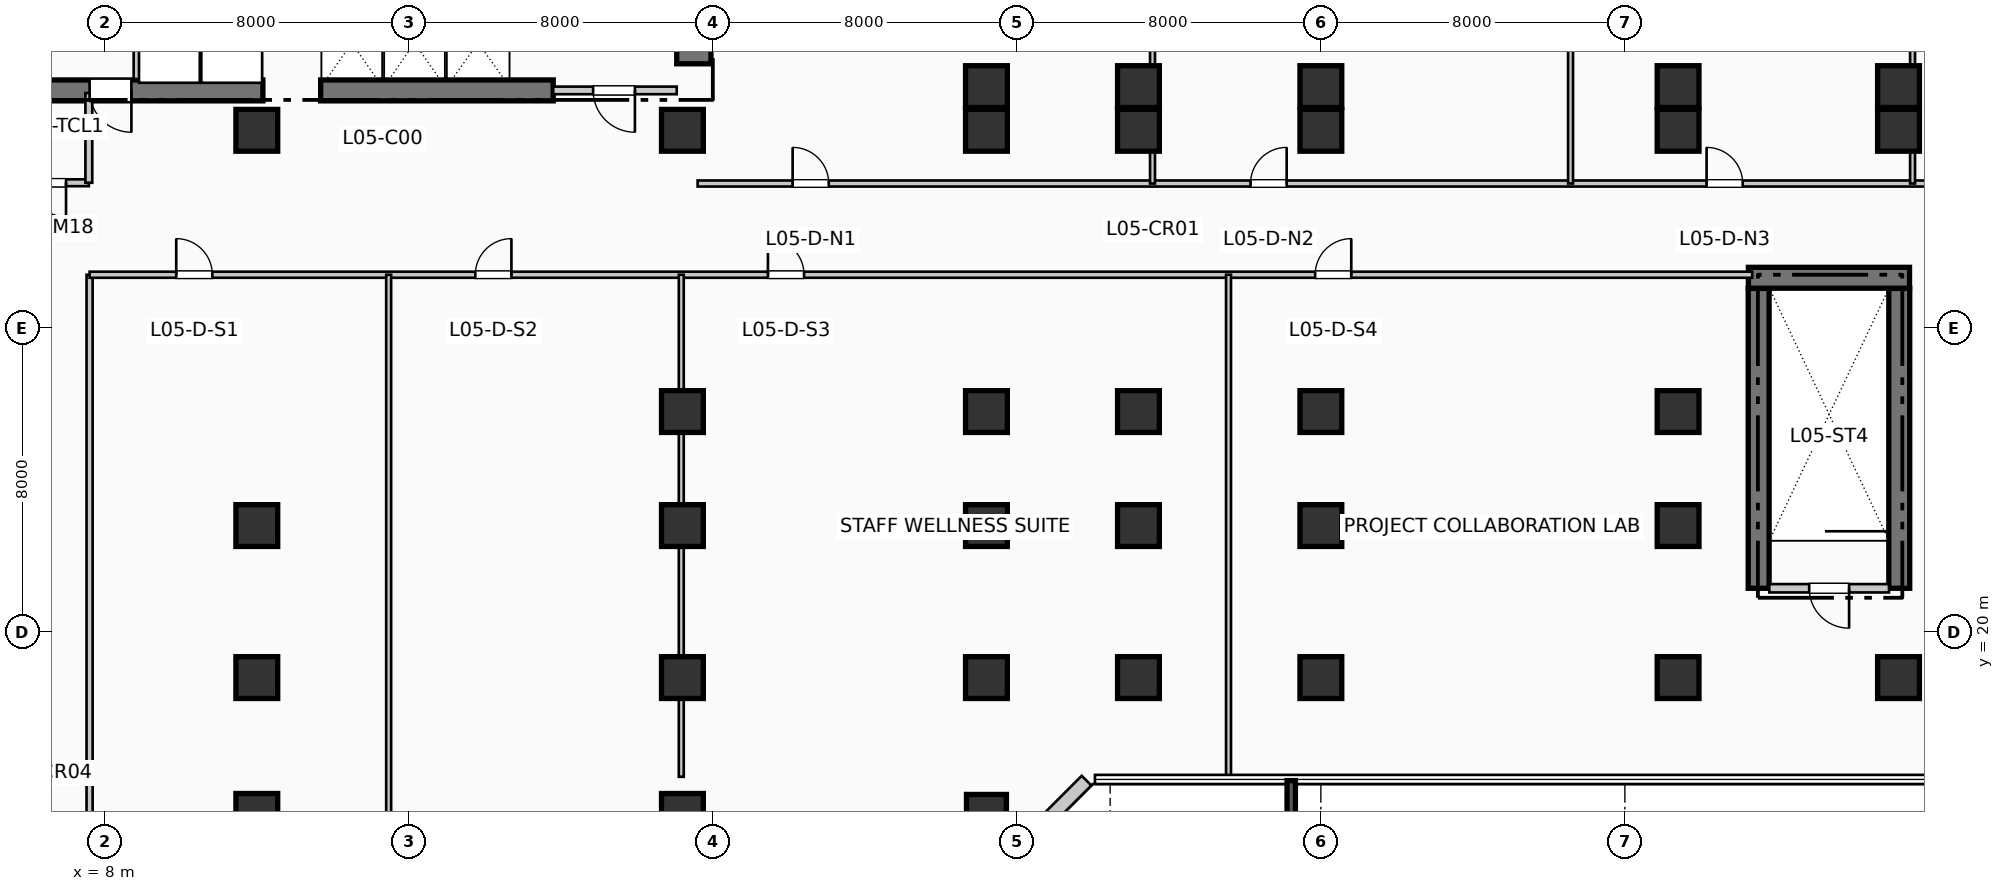
"""IFC4 building model, lengths in metres.
Left out: names, types, materials, properties, quantities, classifications, styles, units other than length and angle.
Written with IfcOpenShell. Run it as: python <this file> out.ifc"""

import sys

from ifc_helpers import new_model, si_unit, direction, frame, frame_2d, origin, origin_2d, place, context, subcontext, project, spatial, rectangle, extrude, element, fill, save


model = new_model("IFC4")
c1 = context("Model", 3, precision=1e-05, world=origin(), true_north=direction((0.0, 1.0)))
c2 = subcontext(c1, "Body", "Model", "MODEL_VIEW")
j1 = project(units=[si_unit("LENGTHUNIT", "METRE"), si_unit("PLANEANGLEUNIT", "RADIAN")], contexts=[c1])
p1 = place(None, origin())
s1 = spatial("IfcSite", under=j1, at=p1, CompositionType="ELEMENT")
p2 = place(p1, origin())
s2 = spatial("IfcBuilding", under=s1, at=p2, CompositionType="ELEMENT")
p3 = place(p2, frame((0.0, 0.0, 25.74)))
s3 = spatial("IfcBuildingStorey", under=s2, at=p3, CompositionType="ELEMENT", Elevation=25.74)
p4 = place(p3, frame((23.5, 34.95, 0.0), z_axis=(0.0, 0.0, 1.0), x_axis=(0.0, 1.0, 0.0)))
e1 = element("IfcWall", 1, at=p4, inside=s3, PredefinedType="SHEAR", context=c2, shape_type="SweptSolid", body=[
    extrude(rectangle(XDim=10.64, YDim=0.9, at=frame_2d((5.32, 0.0))), origin(), (0.0, 0.0, 1.0), 4.62),
])
p5 = place(p3, frame((1.45, 34.25, 0.0), z_axis=(0.0, 0.0, 1.0), x_axis=(1.0, 0.0, 0.0)))
e2 = element("IfcWall", 2, at=p5, inside=s3, PredefinedType="SHEAR", context=c2, shape_type="SweptSolid", body=[
    extrude(rectangle(XDim=10.71, YDim=0.55, at=frame_2d((5.355, 0.0))), origin(), (0.0, 0.0, 1.0), 4.62),
])
p6 = place(p5, frame((7.25, 0.0, 0.0), z_axis=(0.0, 0.0, 1.0), x_axis=(-1.0, 0.0, 0.0)))
e3 = element("IfcOpeningElement", 3, at=p6, cuts=e2, PredefinedType="OPENING", context=c2, shape_type="SweptSolid", body=[
    extrude(rectangle(XDim=1.1, YDim=2.15, at=frame_2d((0.55, 1.075))), frame((0.0, 0.285, 0.0), z_axis=(0.0, -1.0, 0.0), x_axis=(1.0, 0.0, 0.0)), (0.0, 0.0, 1.0), 0.57),
])
p7 = place(p3, frame((13.68, 34.25, 0.0), z_axis=(0.0, 0.0, 1.0), x_axis=(1.0, 0.0, 0.0)))
e4 = element("IfcWall", 4, at=p7, inside=s3, PredefinedType="SHEAR", context=c2, shape_type="SweptSolid", body=[
    extrude(rectangle(XDim=6.12, YDim=0.55, at=frame_2d((3.06, 0.0))), origin(), (0.0, 0.0, 1.0), 4.62),
])
for number, where, z_axis, x_axis in (
    (5, (51.52, 21.15, 0.0), (0.0, 0.0, 1.0), (0.0, 1.0, 0.0)),
    (6, (55.22, 21.15, 0.0), (0.0, 0.0, 1.0), (0.0, 1.0, 0.0)),
):
    element("IfcWall", number, at=place(p3, frame(where, z_axis=z_axis, x_axis=x_axis)), inside=s3, PredefinedType="SHEAR", context=c2, shape_type="SweptSolid", body=[
        extrude(rectangle(XDim=7.89, YDim=0.55, at=frame_2d((3.945, 0.0))), origin(), (0.0, 0.0, 1.0), 4.62),
    ])
p8 = place(p3, frame((51.25, 29.32, 0.0), z_axis=(0.0, 0.0, 1.0), x_axis=(1.0, 0.0, 0.0)))
e7 = element("IfcWall", 7, at=p8, inside=s3, PredefinedType="SHEAR", context=c2, shape_type="SweptSolid", body=[
    extrude(rectangle(XDim=4.24, YDim=0.55, at=frame_2d((2.12, 0.0))), origin(), (0.0, 0.0, 1.0), 4.62),
])
for number, where, z_axis, x_axis in (
    (8, (12.0, 15.2, 0.0), (0.0, 0.0, 1.0), (1.0, 0.0, 0.0)),
    (9, (12.0, 18.8, 0.0), (0.0, 0.0, 1.0), (1.0, 0.0, 0.0)),
    (10, (12.0, 22.8, 0.0), (0.0, 0.0, 1.0), (1.0, 0.0, 0.0)),
    (11, (12.0, 33.2, 0.0), (0.0, 0.0, 1.0), (1.0, 0.0, 0.0)),
    (12, (23.2, 15.2, 0.0), (0.0, 0.0, 1.0), (1.0, 0.0, 0.0)),
    (13, (23.2, 18.8, 0.0), (0.0, 0.0, 1.0), (1.0, 0.0, 0.0)),
    (14, (23.2, 22.8, 0.0), (0.0, 0.0, 1.0), (1.0, 0.0, 0.0)),
    (15, (23.2, 25.8, 0.0), (0.0, 0.0, 1.0), (1.0, 0.0, 0.0)),
    (16, (23.2, 33.2, 0.0), (0.0, 0.0, 1.0), (1.0, 0.0, 0.0)),
):
    element("IfcColumn", number, at=place(p3, frame(where, z_axis=z_axis, x_axis=x_axis)), inside=s3, PredefinedType="COLUMN", context=c2, shape_type="SweptSolid", body=[
        extrude(rectangle(XDim=1.1, YDim=1.1, at=origin_2d()), origin(), (0.0, 0.0, 1.0), 4.62),
    ])
p9 = place(p3, frame((31.2, 15.2, 0.0), z_axis=(0.0, 0.0, 1.0), x_axis=(1.0, 0.0, 0.0)))
e17 = element("IfcColumn", 17, at=p9, inside=s3, PredefinedType="COLUMN", context=c2, shape_type="SweptSolid", body=[
    extrude(rectangle(XDim=1.05, YDim=1.05, at=origin_2d()), origin(), (0.0, 0.0, 1.0), 4.62),
])
for number, where, z_axis, x_axis in (
    (18, (31.2, 18.8, 0.0), (0.0, 0.0, 1.0), (1.0, 0.0, 0.0)),
    (19, (31.2, 22.8, 0.0), (0.0, 0.0, 1.0), (1.0, 0.0, 0.0)),
    (20, (31.2, 25.8, 0.0), (0.0, 0.0, 1.0), (1.0, 0.0, 0.0)),
    (21, (31.2, 33.2, 0.0), (0.0, 0.0, 1.0), (1.0, 0.0, 0.0)),
    (22, (31.2, 34.35, 0.0), (0.0, 0.0, 1.0), (1.0, 0.0, 0.0)),
    (23, (35.2, 18.8, 0.0), (0.0, 0.0, 1.0), (1.0, 0.0, 0.0)),
    (24, (35.2, 22.8, 0.0), (0.0, 0.0, 1.0), (1.0, 0.0, 0.0)),
    (25, (35.2, 25.8, 0.0), (0.0, 0.0, 1.0), (1.0, 0.0, 0.0)),
    (26, (35.2, 33.2, 0.0), (0.0, 0.0, 1.0), (1.0, 0.0, 0.0)),
    (27, (35.2, 34.35, 0.0), (0.0, 0.0, 1.0), (1.0, 0.0, 0.0)),
    (28, (40.0, 18.8, 0.0), (0.0, 0.0, 1.0), (1.0, 0.0, 0.0)),
    (29, (40.0, 22.8, 0.0), (0.0, 0.0, 1.0), (1.0, 0.0, 0.0)),
    (30, (40.0, 25.8, 0.0), (0.0, 0.0, 1.0), (1.0, 0.0, 0.0)),
    (31, (40.0, 33.2, 0.0), (0.0, 0.0, 1.0), (1.0, 0.0, 0.0)),
    (32, (40.0, 34.35, 0.0), (0.0, 0.0, 1.0), (1.0, 0.0, 0.0)),
    (33, (49.4, 18.8, 0.0), (0.0, 0.0, 1.0), (1.0, 0.0, 0.0)),
    (34, (49.4, 22.8, 0.0), (0.0, 0.0, 1.0), (1.0, 0.0, 0.0)),
    (35, (49.4, 25.8, 0.0), (0.0, 0.0, 1.0), (1.0, 0.0, 0.0)),
    (36, (49.4, 33.2, 0.0), (0.0, 0.0, 1.0), (1.0, 0.0, 0.0)),
    (37, (49.4, 34.35, 0.0), (0.0, 0.0, 1.0), (1.0, 0.0, 0.0)),
    (38, (55.2, 18.8, 0.0), (0.0, 0.0, 1.0), (1.0, 0.0, 0.0)),
    (39, (55.2, 33.2, 0.0), (0.0, 0.0, 1.0), (1.0, 0.0, 0.0)),
    (40, (55.2, 34.35, 0.0), (0.0, 0.0, 1.0), (1.0, 0.0, 0.0)),
):
    element("IfcColumn", number, at=place(p3, frame(where, z_axis=z_axis, x_axis=x_axis)), inside=s3, PredefinedType="COLUMN", context=c2, shape_type="SweptSolid", body=[
        extrude(rectangle(XDim=1.1, YDim=1.1, at=origin_2d()), origin(), (0.0, 0.0, 1.0), 4.62),
    ])
p10 = place(p3, frame((31.912, 14.166, 0.0), z_axis=(0.0, 0.0, 1.0), x_axis=(0.707106781187, 0.707106781187, 0.0)))
e41 = element("IfcWall", 41, at=p10, inside=s3, PredefinedType="SOLIDWALL", context=c2, shape_type="SweptSolid", body=[
    extrude(rectangle(XDim=2.718, YDim=0.36, at=frame_2d((1.359, 0.0))), origin(), (0.0, 0.0, 1.0), 4.37),
])
p11 = place(p3, frame((8.86, 34.55, 0.0), z_axis=(0.0, 0.0, 1.0), x_axis=(0.0, 1.0, 0.0)))
e42 = element("IfcWall", 42, at=p11, inside=s3, PredefinedType="PARTITIONING", context=c2, shape_type="SweptSolid", body=[
    extrude(rectangle(XDim=2.5, YDim=0.2, at=frame_2d((1.25, 0.0))), origin(), (0.0, 0.0, 1.0), 4.37),
])
p12 = place(p3, frame((19.8, 34.25, 0.0), z_axis=(0.0, 0.0, 1.0), x_axis=(1.0, 0.0, 0.0)))
e43 = element("IfcWall", 43, at=p12, inside=s3, PredefinedType="PARTITIONING", context=c2, shape_type="SweptSolid", body=[
    extrude(rectangle(XDim=3.25, YDim=0.2, at=frame_2d((1.625, 0.0))), origin(), (0.0, 0.0, 1.0), 4.37),
])
p13 = place(p12, frame((2.15, 0.0, 0.0), z_axis=(0.0, 0.0, 1.0), x_axis=(-1.0, 0.0, 0.0)))
e44 = element("IfcOpeningElement", 44, at=p13, cuts=e43, PredefinedType="OPENING", context=c2, shape_type="SweptSolid", body=[
    extrude(rectangle(XDim=1.1, YDim=2.15, at=frame_2d((0.55, 1.075))), frame((0.0, 0.11, 0.0), z_axis=(0.0, -1.0, 0.0), x_axis=(1.0, 0.0, 0.0)), (0.0, 0.0, 1.0), 0.22),
])
p14 = place(p3, frame((5.5, 31.82, 0.0), z_axis=(0.0, 0.0, 1.0), x_axis=(1.0, 0.0, 0.0)))
e45 = element("IfcWall", 45, at=p14, inside=s3, PredefinedType="PLUMBINGWALL", context=c2, shape_type="SweptSolid", body=[
    extrude(rectangle(XDim=2.08, YDim=0.18, at=frame_2d((1.04, 0.0))), origin(), (0.0, 0.0, 1.0), 4.37),
])
p15 = place(p14, frame((1.48, 0.0, 0.0), z_axis=(0.0, 0.0, 1.0), x_axis=(-1.0, 0.0, 0.0)))
e46 = element("IfcOpeningElement", 46, at=p15, cuts=e45, PredefinedType="OPENING", context=c2, shape_type="SweptSolid", body=[
    extrude(rectangle(XDim=0.9, YDim=2.1, at=frame_2d((0.45, 1.05))), frame((0.0, 0.1, 0.0), z_axis=(0.0, -1.0, 0.0), x_axis=(1.0, 0.0, 0.0)), (0.0, 0.0, 1.0), 0.2),
])
p16 = place(p3, frame((7.58, 31.82, 0.0), z_axis=(0.0, 0.0, 1.0), x_axis=(0.0, 1.0, 0.0)))
e47 = element("IfcWall", 47, at=p16, inside=s3, PredefinedType="PLUMBINGWALL", context=c2, shape_type="SweptSolid", body=[
    extrude(rectangle(XDim=2.36, YDim=0.18, at=frame_2d((1.18, 0.0))), origin(), (0.0, 0.0, 1.0), 4.37),
])
p17 = place(p3, frame((51.8, 21.15, 0.0), z_axis=(0.0, 0.0, 1.0), x_axis=(1.0, 0.0, 0.0)))
e48 = element("IfcWall", 48, at=p17, inside=s3, PredefinedType="PARTITIONING", context=c2, shape_type="SweptSolid", body=[
    extrude(rectangle(XDim=3.15, YDim=0.22, at=frame_2d((1.575, 0.0))), origin(), (0.0, 0.0, 1.0), 4.37),
])
p18 = place(p17, frame((2.1, 0.0, 0.0), z_axis=(0.0, 0.0, 1.0), x_axis=(-1.0, 0.0, 0.0)))
e49 = element("IfcOpeningElement", 49, at=p18, cuts=e48, PredefinedType="OPENING", context=c2, shape_type="SweptSolid", body=[
    extrude(rectangle(XDim=1.05, YDim=2.15, at=frame_2d((0.525, 1.075))), frame((0.0, 0.12, 0.0), z_axis=(0.0, -1.0, 0.0), x_axis=(1.0, 0.0, 0.0)), (0.0, 0.0, 1.0), 0.24),
])
p19 = place(p3, frame((7.6, -1.81, 0.0), z_axis=(0.0, 0.0, 1.0), x_axis=(0.0, 1.0, 0.0)))
e50 = element("IfcWall", 50, at=p19, inside=s3, PredefinedType="PARTITIONING", context=c2, shape_type="SweptSolid", body=[
    extrude(rectangle(XDim=31.21, YDim=0.16, at=frame_2d((15.605, 0.0))), origin(), (0.0, 0.0, 1.0), 4.37),
])
p20 = place(p3, frame((7.6, 29.4, 0.0), z_axis=(0.0, 0.0, 1.0), x_axis=(1.0, 0.0, 0.0)))
e51 = element("IfcWall", 51, at=p20, inside=s3, PredefinedType="PARTITIONING", context=c2, shape_type="SweptSolid", body=[
    extrude(rectangle(XDim=43.75, YDim=0.16, at=frame_2d((21.875, 0.0))), origin(), (0.0, 0.0, 1.0), 4.025),
])
p21 = place(p20, frame((2.28, 0.0, 0.0)))
e52 = element("IfcOpeningElement", 52, at=p21, cuts=e51, PredefinedType="OPENING", context=c2, shape_type="SweptSolid", body=[
    extrude(rectangle(XDim=0.95, YDim=2.15, at=frame_2d((0.475, 1.075))), frame((0.0, 0.09, 0.0), z_axis=(0.0, -1.0, 0.0), x_axis=(1.0, 0.0, 0.0)), (0.0, 0.0, 1.0), 0.18),
])
p22 = place(p20, frame((10.15, 0.0, 0.0)))
e53 = element("IfcOpeningElement", 53, at=p22, cuts=e51, PredefinedType="OPENING", context=c2, shape_type="SweptSolid", body=[
    extrude(rectangle(XDim=0.95, YDim=2.15, at=frame_2d((0.475, 1.075))), frame((0.0, 0.09, 0.0), z_axis=(0.0, -1.0, 0.0), x_axis=(1.0, 0.0, 0.0)), (0.0, 0.0, 1.0), 0.18),
])
p23 = place(p20, frame((17.85, 0.0, 0.0)))
e54 = element("IfcOpeningElement", 54, at=p23, cuts=e51, PredefinedType="OPENING", context=c2, shape_type="SweptSolid", body=[
    extrude(rectangle(XDim=0.95, YDim=2.15, at=frame_2d((0.475, 1.075))), frame((0.0, 0.09, 0.0), z_axis=(0.0, -1.0, 0.0), x_axis=(1.0, 0.0, 0.0)), (0.0, 0.0, 1.0), 0.18),
])
p24 = place(p20, frame((32.25, 0.0, 0.0)))
e55 = element("IfcOpeningElement", 55, at=p24, cuts=e51, PredefinedType="OPENING", context=c2, shape_type="SweptSolid", body=[
    extrude(rectangle(XDim=0.95, YDim=2.15, at=frame_2d((0.475, 1.075))), frame((0.0, 0.09, 0.0), z_axis=(0.0, -1.0, 0.0), x_axis=(1.0, 0.0, 0.0)), (0.0, 0.0, 1.0), 0.18),
])
p25 = place(p3, frame((15.47, -1.81, 0.0), z_axis=(0.0, 0.0, 1.0), x_axis=(0.0, 1.0, 0.0)))
e56 = element("IfcWall", 56, at=p25, inside=s3, PredefinedType="PARTITIONING", context=c2, shape_type="SweptSolid", body=[
    extrude(rectangle(XDim=31.21, YDim=0.13, at=frame_2d((15.605, 0.0))), origin(), (0.0, 0.0, 1.0), 4.37),
])
p26 = place(p3, frame((23.17, 16.19, 0.0), z_axis=(0.0, 0.0, 1.0), x_axis=(0.0, 1.0, 0.0)))
e57 = element("IfcWall", 57, at=p26, inside=s3, PredefinedType="PARTITIONING", context=c2, shape_type="SweptSolid", body=[
    extrude(rectangle(XDim=13.21, YDim=0.13, at=frame_2d((6.605, 0.0))), origin(), (0.0, 0.0, 1.0), 3.555),
])
p27 = place(p3, frame((37.57, 16.19, 0.0), z_axis=(0.0, 0.0, 1.0), x_axis=(0.0, 1.0, 0.0)))
e58 = element("IfcWall", 58, at=p27, inside=s3, PredefinedType="PARTITIONING", context=c2, shape_type="SweptSolid", body=[
    extrude(rectangle(XDim=13.21, YDim=0.13, at=frame_2d((6.605, 0.0))), origin(), (0.0, 0.0, 1.0), 4.37),
])
p28 = place(p3, frame((23.6, 31.8, 0.0), z_axis=(0.0, 0.0, 1.0), x_axis=(1.0, 0.0, 0.0)))
e59 = element("IfcWall", 59, at=p28, inside=s3, PredefinedType="PARTITIONING", context=c2, shape_type="SweptSolid", body=[
    extrude(rectangle(XDim=42.21, YDim=0.16, at=frame_2d((21.105, 0.0))), origin(), (0.0, 0.0, 1.0), 4.37),
])
p29 = place(p28, frame((2.5, 0.0, 0.0)))
e60 = element("IfcOpeningElement", 60, at=p29, cuts=e59, PredefinedType="OPENING", context=c2, shape_type="SweptSolid", body=[
    extrude(rectangle(XDim=0.95, YDim=2.15, at=frame_2d((0.475, 1.075))), frame((0.0, 0.09, 0.0), z_axis=(0.0, -1.0, 0.0), x_axis=(1.0, 0.0, 0.0)), (0.0, 0.0, 1.0), 0.18),
])
p30 = place(p28, frame((14.55, 0.0, 0.0)))
e61 = element("IfcOpeningElement", 61, at=p30, cuts=e59, PredefinedType="OPENING", context=c2, shape_type="SweptSolid", body=[
    extrude(rectangle(XDim=0.95, YDim=2.15, at=frame_2d((0.475, 1.075))), frame((0.0, 0.09, 0.0), z_axis=(0.0, -1.0, 0.0), x_axis=(1.0, 0.0, 0.0)), (0.0, 0.0, 1.0), 0.18),
])
p31 = place(p28, frame((26.55, 0.0, 0.0)))
e62 = element("IfcOpeningElement", 62, at=p31, cuts=e59, PredefinedType="OPENING", context=c2, shape_type="SweptSolid", body=[
    extrude(rectangle(XDim=0.95, YDim=2.15, at=frame_2d((0.475, 1.075))), frame((0.0, 0.09, 0.0), z_axis=(0.0, -1.0, 0.0), x_axis=(1.0, 0.0, 0.0)), (0.0, 0.0, 1.0), 0.18),
])
p32 = place(p28, frame((34.55, 0.0, 0.0)))
e63 = element("IfcOpeningElement", 63, at=p32, cuts=e59, PredefinedType="OPENING", context=c2, shape_type="SweptSolid", body=[
    extrude(rectangle(XDim=0.95, YDim=2.15, at=frame_2d((0.475, 1.075))), frame((0.0, 0.09, 0.0), z_axis=(0.0, -1.0, 0.0), x_axis=(1.0, 0.0, 0.0)), (0.0, 0.0, 1.0), 0.18),
])
p33 = place(p3, frame((35.57, 31.8, 0.0), z_axis=(0.0, 0.0, 1.0), x_axis=(0.0, 1.0, 0.0)))
e64 = element("IfcWall", 64, at=p33, inside=s3, PredefinedType="PARTITIONING", context=c2, shape_type="SweptSolid", body=[
    extrude(rectangle(XDim=16.01, YDim=0.13, at=frame_2d((8.005, 0.0))), origin(), (0.0, 0.0, 1.0), 3.555),
])
p34 = place(p3, frame((46.57, 31.8, 0.0), z_axis=(0.0, 0.0, 1.0), x_axis=(0.0, 1.0, 0.0)))
e65 = element("IfcWall", 65, at=p34, inside=s3, PredefinedType="PARTITIONING", context=c2, shape_type="SweptSolid", body=[
    extrude(rectangle(XDim=16.01, YDim=0.13, at=frame_2d((8.005, 0.0))), origin(), (0.0, 0.0, 1.0), 4.37),
])
p35 = place(p3, frame((55.57, 31.8, 0.0), z_axis=(0.0, 0.0, 1.0), x_axis=(0.0, 1.0, 0.0)))
e66 = element("IfcWall", 66, at=p35, inside=s3, PredefinedType="PARTITIONING", context=c2, shape_type="SweptSolid", body=[
    extrude(rectangle(XDim=16.01, YDim=0.13, at=frame_2d((8.005, 0.0))), origin(), (0.0, 0.0, 1.0), 3.555),
])
p36 = place(p6, origin())
e67 = element("IfcDoor", 67, at=p36, inside=s3, OperationType="SINGLE_SWING_RIGHT", PredefinedType="DOOR", context=c2, shape_type="SweptSolid", body=[
    extrude(rectangle(XDim=1.1, YDim=2.15, at=frame_2d((0.55, 1.075))), frame((0.0, 0.025, 0.0), z_axis=(0.0, -1.0, 0.0), x_axis=(1.0, 0.0, 0.0)), (0.0, 0.0, 1.0), 0.05),
])
fill(e3, e67)
p37 = place(p13, origin())
e68 = element("IfcDoor", 68, at=p37, inside=s3, OperationType="SINGLE_SWING_RIGHT", PredefinedType="DOOR", context=c2, shape_type="SweptSolid", body=[
    extrude(rectangle(XDim=1.1, YDim=2.15, at=frame_2d((0.55, 1.075))), frame((0.0, 0.025, 0.0), z_axis=(0.0, -1.0, 0.0), x_axis=(1.0, 0.0, 0.0)), (0.0, 0.0, 1.0), 0.05),
])
fill(e44, e68)
p38 = place(p15, origin())
e69 = element("IfcDoor", 69, at=p38, inside=s3, OperationType="SINGLE_SWING_RIGHT", PredefinedType="DOOR", context=c2, shape_type="SweptSolid", body=[
    extrude(rectangle(XDim=0.9, YDim=2.1, at=frame_2d((0.45, 1.05))), frame((0.0, 0.025, 0.0), z_axis=(0.0, -1.0, 0.0), x_axis=(1.0, 0.0, 0.0)), (0.0, 0.0, 1.0), 0.05),
])
fill(e46, e69)
p39 = place(p18, origin())
e70 = element("IfcDoor", 70, at=p39, inside=s3, OperationType="SINGLE_SWING_RIGHT", PredefinedType="DOOR", context=c2, shape_type="SweptSolid", body=[
    extrude(rectangle(XDim=1.05, YDim=2.15, at=frame_2d((0.525, 1.075))), frame((0.0, 0.025, 0.0), z_axis=(0.0, -1.0, 0.0), x_axis=(1.0, 0.0, 0.0)), (0.0, 0.0, 1.0), 0.05),
])
fill(e49, e70)
p40 = place(p21, origin())
e71 = element("IfcDoor", 71, at=p40, inside=s3, OperationType="SINGLE_SWING_LEFT", PredefinedType="DOOR", context=c2, shape_type="SweptSolid", body=[
    extrude(rectangle(XDim=0.95, YDim=2.15, at=frame_2d((0.475, 1.075))), frame((0.0, 0.025, 0.0), z_axis=(0.0, -1.0, 0.0), x_axis=(1.0, 0.0, 0.0)), (0.0, 0.0, 1.0), 0.05),
])
fill(e52, e71)
p41 = place(p22, origin())
e72 = element("IfcDoor", 72, at=p41, inside=s3, OperationType="SINGLE_SWING_RIGHT", PredefinedType="DOOR", context=c2, shape_type="SweptSolid", body=[
    extrude(rectangle(XDim=0.95, YDim=2.15, at=frame_2d((0.475, 1.075))), frame((0.0, 0.025, 0.0), z_axis=(0.0, -1.0, 0.0), x_axis=(1.0, 0.0, 0.0)), (0.0, 0.0, 1.0), 0.05),
])
fill(e53, e72)
p42 = place(p23, origin())
e73 = element("IfcDoor", 73, at=p42, inside=s3, OperationType="SINGLE_SWING_LEFT", PredefinedType="DOOR", context=c2, shape_type="SweptSolid", body=[
    extrude(rectangle(XDim=0.95, YDim=2.15, at=frame_2d((0.475, 1.075))), frame((0.0, 0.025, 0.0), z_axis=(0.0, -1.0, 0.0), x_axis=(1.0, 0.0, 0.0)), (0.0, 0.0, 1.0), 0.05),
])
fill(e54, e73)
p43 = place(p24, origin())
e74 = element("IfcDoor", 74, at=p43, inside=s3, OperationType="SINGLE_SWING_RIGHT", PredefinedType="DOOR", context=c2, shape_type="SweptSolid", body=[
    extrude(rectangle(XDim=0.95, YDim=2.15, at=frame_2d((0.475, 1.075))), frame((0.0, 0.025, 0.0), z_axis=(0.0, -1.0, 0.0), x_axis=(1.0, 0.0, 0.0)), (0.0, 0.0, 1.0), 0.05),
])
fill(e55, e74)
p44 = place(p29, origin())
e75 = element("IfcDoor", 75, at=p44, inside=s3, OperationType="SINGLE_SWING_LEFT", PredefinedType="DOOR", context=c2, shape_type="SweptSolid", body=[
    extrude(rectangle(XDim=0.95, YDim=2.15, at=frame_2d((0.475, 1.075))), frame((0.0, 0.025, 0.0), z_axis=(0.0, -1.0, 0.0), x_axis=(1.0, 0.0, 0.0)), (0.0, 0.0, 1.0), 0.05),
])
fill(e60, e75)
p45 = place(p30, origin())
e76 = element("IfcDoor", 76, at=p45, inside=s3, OperationType="SINGLE_SWING_RIGHT", PredefinedType="DOOR", context=c2, shape_type="SweptSolid", body=[
    extrude(rectangle(XDim=0.95, YDim=2.15, at=frame_2d((0.475, 1.075))), frame((0.0, 0.025, 0.0), z_axis=(0.0, -1.0, 0.0), x_axis=(1.0, 0.0, 0.0)), (0.0, 0.0, 1.0), 0.05),
])
fill(e61, e76)
p46 = place(p31, origin())
e77 = element("IfcDoor", 77, at=p46, inside=s3, OperationType="SINGLE_SWING_LEFT", PredefinedType="DOOR", context=c2, shape_type="SweptSolid", body=[
    extrude(rectangle(XDim=0.95, YDim=2.15, at=frame_2d((0.475, 1.075))), frame((0.0, 0.025, 0.0), z_axis=(0.0, -1.0, 0.0), x_axis=(1.0, 0.0, 0.0)), (0.0, 0.0, 1.0), 0.05),
])
fill(e62, e77)
save(model, sys.argv[1])
